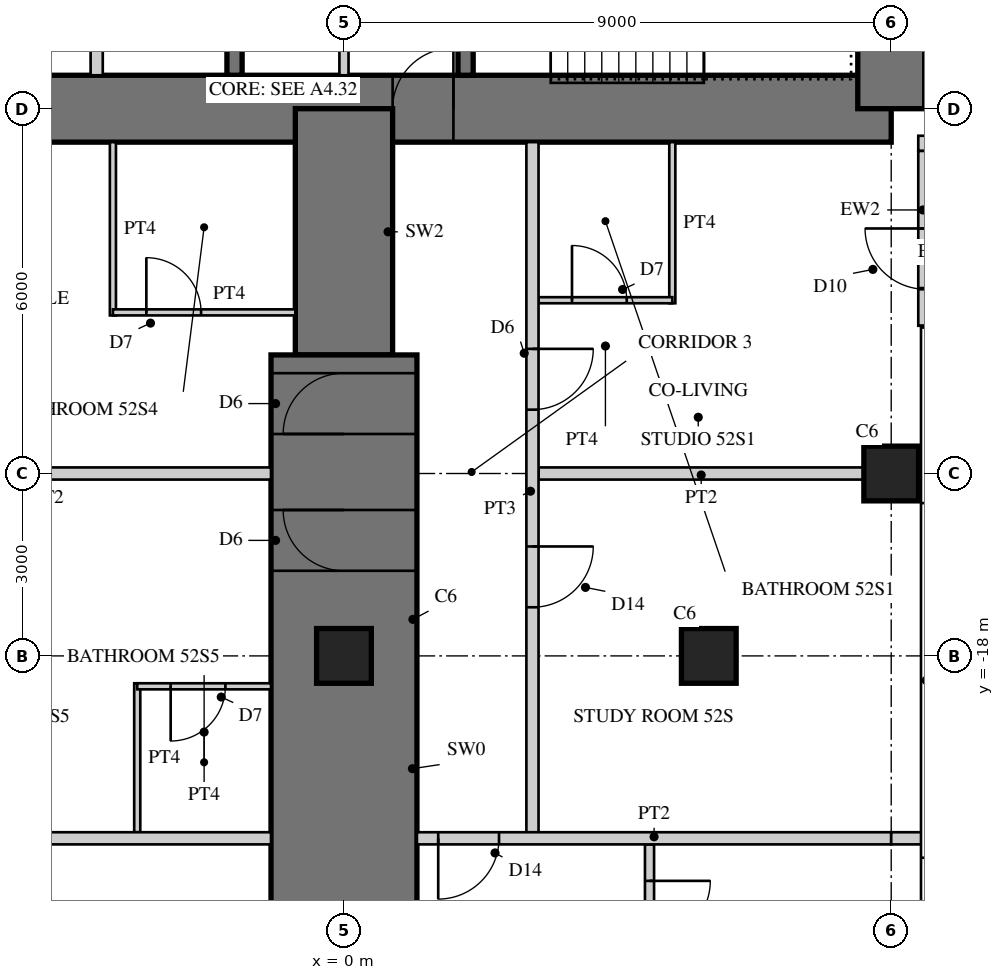
"""IFC4 building model, lengths in metres.
Left out: names, types, materials, properties, quantities, classifications, styles, units other than length and angle.
Written with IfcOpenShell. Run it as: python <this file> out.ifc"""

import sys

from ifc_helpers import new_model, si_unit, direction, frame, frame_2d, origin, origin_2d, place, context, subcontext, project, spatial, rectangle, hollow_rectangle, extrude, element, fill, save


model = new_model("IFC4")
c1 = context("Model", 3, precision=1e-05, world=origin(), true_north=direction((0.0, 1.0)))
c2 = subcontext(c1, "Body", "Model", "MODEL_VIEW")
j1 = project(units=[si_unit("LENGTHUNIT", "METRE"), si_unit("PLANEANGLEUNIT", "RADIAN")], contexts=[c1])
p1 = place(None, origin())
s1 = spatial("IfcSite", under=j1, at=p1, CompositionType="ELEMENT")
p2 = place(p1, origin())
s2 = spatial("IfcBuilding", under=s1, at=p2, CompositionType="ELEMENT")
p3 = place(p2, frame((0.0, 0.0, 206.9)))
s3 = spatial("IfcBuildingStorey", under=s2, at=p3, CompositionType="ELEMENT", Elevation=206.9)
p4 = place(p3, frame((-9.0, -9.0, 0.0), z_axis=(0.0, 0.0, 1.0), x_axis=(1.0, 0.0, 0.0)))
e1 = element("IfcWall", 1, at=p4, inside=s3, PredefinedType="SHEAR", context=c2, shape_type="SweptSolid", body=[
    extrude(rectangle(XDim=18.0, YDim=1.1, at=frame_2d((9.0, 0.0))), origin(), (0.0, 0.0, 1.0), 3.4),
])
p5 = place(p4, frame((9.8, 0.0, 0.0)))
e2 = element("IfcOpeningElement", 2, at=p5, cuts=e1, PredefinedType="OPENING", context=c2, shape_type="SweptSolid", body=[
    extrude(rectangle(XDim=1.0, YDim=2.4, at=frame_2d((0.5, 1.2))), frame((0.0, 0.56, 0.0), z_axis=(0.0, -1.0, 0.0), x_axis=(1.0, 0.0, 0.0)), (0.0, 0.0, 1.0), 1.12),
])
p6 = place(p3, frame((9.0, -9.0, 0.0), z_axis=(0.0, 0.0, 1.0), x_axis=(0.0, 1.0, 0.0)))
e3 = element("IfcWall", 3, at=p6, inside=s3, PredefinedType="SHEAR", context=c2, shape_type="SweptSolid", body=[
    extrude(rectangle(XDim=18.0, YDim=1.1, at=frame_2d((9.0, 0.0))), origin(), (0.0, 0.0, 1.0), 3.4),
])
p7 = place(p6, frame((9.8, 0.0, 0.0)))
e4 = element("IfcOpeningElement", 4, at=p7, cuts=e3, PredefinedType="OPENING", context=c2, shape_type="SweptSolid", body=[
    extrude(rectangle(XDim=1.0, YDim=2.4, at=frame_2d((0.5, 1.2))), frame((0.0, 0.56, 0.0), z_axis=(0.0, -1.0, 0.0), x_axis=(1.0, 0.0, 0.0)), (0.0, 0.0, 1.0), 1.12),
])
p8 = place(p3, frame((-1.8, -1.875, 0.0), z_axis=(0.0, 0.0, 1.0), x_axis=(0.0, -1.0, 0.0)))
e5 = element("IfcWall", 5, at=p8, inside=s3, PredefinedType="SHEAR", context=c2, shape_type="SweptSolid", body=[
    extrude(rectangle(XDim=6.575, YDim=0.25, at=frame_2d((3.288, 0.0))), origin(), (0.0, 0.0, 1.0), 3.4),
])
p9 = place(p8, frame((1.875, 0.0, 0.0)))
e6 = element("IfcOpeningElement", 6, at=p9, cuts=e5, PredefinedType="OPENING", context=c2, shape_type="SweptSolid", body=[
    extrude(rectangle(XDim=1.6, YDim=2.4, at=frame_2d((0.8, 1.2))), frame((0.0, 0.135, 0.0), z_axis=(0.0, -1.0, 0.0), x_axis=(1.0, 0.0, 0.0)), (0.0, 0.0, 1.0), 0.27),
])
p10 = place(p3, frame((-4.067, -5.975, 0.0), z_axis=(0.0, 0.0, 1.0), x_axis=(0.0, -1.0, 0.0)))
e7 = element("IfcWall", 7, at=p10, inside=s3, PredefinedType="PARTITIONING", context=c2, shape_type="SweptSolid", body=[
    extrude(rectangle(XDim=2.475, YDim=0.2, at=frame_2d((1.237, 0.0))), origin(), (0.0, 0.0, 1.0), 3.4),
])
p11 = place(p3, frame((2.0, -1.675, 0.0), z_axis=(0.0, 0.0, 1.0), x_axis=(0.0, -1.0, 0.0)))
e8 = element("IfcWall", 8, at=p11, inside=s3, PredefinedType="SHEAR", context=c2, shape_type="SweptSolid", body=[
    extrude(rectangle(XDim=6.775, YDim=0.25, at=frame_2d((3.387, 0.0))), origin(), (0.0, 0.0, 1.0), 3.4),
])
p12 = place(p11, frame((0.725, 0.0, 0.0)))
e9 = element("IfcOpeningElement", 9, at=p12, cuts=e8, PredefinedType="OPENING", context=c2, shape_type="SweptSolid", body=[
    extrude(rectangle(XDim=1.0, YDim=2.1, at=frame_2d((0.5, 1.05))), frame((0.0, 0.135, 0.0), z_axis=(0.0, -1.0, 0.0), x_axis=(1.0, 0.0, 0.0)), (0.0, 0.0, 1.0), 0.27),
])
p13 = place(p3, frame((0.0, -9.0, 0.0), z_axis=(0.0, 0.0, 1.0), x_axis=(0.0, -1.0, 0.0)))
e10 = element("IfcWall", 10, at=p13, inside=s3, PredefinedType="SHEAR", context=c2, shape_type="SweptSolid", body=[
    extrude(rectangle(XDim=4.05, YDim=1.6, at=frame_2d((2.025, 0.0))), origin(), (0.0, 0.0, 1.0), 3.4),
])
p14 = place(p3, frame((0.0, -13.05, 0.0), z_axis=(0.0, 0.0, 1.0), x_axis=(0.0, -1.0, 0.0)))
e11 = element("IfcWall", 11, at=p14, inside=s3, PredefinedType="SHEAR", context=c2, shape_type="SweptSolid", body=[
    extrude(rectangle(XDim=13.95, YDim=2.4, at=frame_2d((6.975, 0.0))), origin(), (0.0, 0.0, 1.0), 3.4),
])
p15 = place(p14, frame((0.3, 0.0, 0.0)))
e12 = element("IfcOpeningElement", 12, at=p15, cuts=e11, PredefinedType="OPENING", context=c2, shape_type="SweptSolid", body=[
    extrude(rectangle(XDim=1.0, YDim=2.15, at=frame_2d((0.5, 1.075))), frame((0.0, 1.21, 0.0), z_axis=(0.0, -1.0, 0.0), x_axis=(1.0, 0.0, 0.0)), (0.0, 0.0, 1.0), 2.42),
])
p16 = place(p14, frame((2.55, 0.0, 0.0)))
e13 = element("IfcOpeningElement", 13, at=p16, cuts=e11, PredefinedType="OPENING", context=c2, shape_type="SweptSolid", body=[
    extrude(rectangle(XDim=1.0, YDim=2.15, at=frame_2d((0.5, 1.075))), frame((0.0, 1.21, 0.0), z_axis=(0.0, -1.0, 0.0), x_axis=(1.0, 0.0, 0.0)), (0.0, 0.0, 1.0), 2.42),
])
p17 = place(p14, frame((9.2, 0.0, 0.0)))
e14 = element("IfcOpeningElement", 14, at=p17, cuts=e11, PredefinedType="OPENING", context=c2, shape_type="SweptSolid", body=[
    extrude(rectangle(XDim=1.0, YDim=2.2, at=frame_2d((0.5, 1.1))), frame((0.0, 1.21, 0.0), z_axis=(0.0, -1.0, 0.0), x_axis=(1.0, 0.0, 0.0)), (0.0, 0.0, 1.0), 2.42),
])
for number, where, z_axis, x_axis in (
    (15, (9.0, -15.0, 0.0), (0.0, 0.0, 1.0), (1.0, 0.0, 0.0)),
    (16, (0.0, -18.0, 0.0), (0.0, 0.0, 1.0), (1.0, 0.0, 0.0)),
    (17, (6.0, -18.0, 0.0), (0.0, 0.0, 1.0), (1.0, 0.0, 0.0)),
):
    element("IfcColumn", number, at=place(p3, frame(where, z_axis=z_axis, x_axis=x_axis)), inside=s3, PredefinedType="COLUMN", context=c2, shape_type="SweptSolid", body=[
        extrude(rectangle(XDim=0.9, YDim=0.9, at=origin_2d()), origin(), (0.0, 0.0, 1.0), 3.4),
    ])
p18 = place(p3, frame((9.445, -9.57, 0.0), z_axis=(0.0, 0.0, 1.0), x_axis=(1.0, 0.0, 0.0)))
e18 = element("IfcWall", 18, at=p18, inside=s3, PredefinedType="SOLIDWALL", context=c2, shape_type="SweptSolid", body=[
    extrude(rectangle(XDim=3.125, YDim=0.25, at=frame_2d((1.562, 0.0))), origin(), (0.0, 0.0, 1.0), 3.22),
])
p19 = place(p18, frame((0.6, 0.0, 0.0)))
e19 = element("IfcOpeningElement", 19, at=p19, cuts=e18, PredefinedType="OPENING", context=c2, shape_type="SweptSolid", body=[
    extrude(rectangle(XDim=1.0, YDim=2.2, at=frame_2d((0.5, 1.1))), frame((0.0, 0.135, 0.0), z_axis=(0.0, -1.0, 0.0), x_axis=(1.0, 0.0, 0.0)), (0.0, 0.0, 1.0), 0.27),
])
p20 = place(p3, frame((9.57, -12.57, 0.0), z_axis=(0.0, 0.0, 1.0), x_axis=(0.0, 1.0, 0.0)))
e20 = element("IfcWall", 20, at=p20, inside=s3, PredefinedType="SOLIDWALL", context=c2, shape_type="SweptSolid", body=[
    extrude(rectangle(XDim=2.875, YDim=0.25, at=frame_2d((1.438, 0.0))), origin(), (0.0, 0.0, 1.0), 3.22),
])
p21 = place(p20, frame((0.6, 0.0, 0.0)))
e21 = element("IfcOpeningElement", 21, at=p21, cuts=e20, PredefinedType="OPENING", context=c2, shape_type="SweptSolid", body=[
    extrude(rectangle(XDim=1.0, YDim=2.2, at=frame_2d((0.5, 1.1))), frame((0.0, 0.135, 0.0), z_axis=(0.0, -1.0, 0.0), x_axis=(1.0, 0.0, 0.0)), (0.0, 0.0, 1.0), 0.27),
])
p22 = place(p3, frame((0.0, -5.675, 0.0), z_axis=(0.0, 0.0, 1.0), x_axis=(0.0, -1.0, 0.0)))
e22 = element("IfcWall", 22, at=p22, inside=s3, PredefinedType="PARTITIONING", context=c2, shape_type="SweptSolid", body=[
    extrude(rectangle(XDim=2.775, YDim=0.15, at=frame_2d((1.387, 0.0))), origin(), (0.0, 0.0, 1.0), 3.22),
])
p23 = place(p22, frame((0.4, 0.0, 0.0)))
e23 = element("IfcOpeningElement", 23, at=p23, cuts=e22, PredefinedType="OPENING", context=c2, shape_type="SweptSolid", body=[
    extrude(rectangle(XDim=1.0, YDim=2.1, at=frame_2d((0.5, 1.05))), frame((0.0, 0.085, 0.0), z_axis=(0.0, -1.0, 0.0), x_axis=(1.0, 0.0, 0.0)), (0.0, 0.0, 1.0), 0.17),
])
p24 = place(p3, frame((5.4, -9.55, 0.0), z_axis=(0.0, 0.0, 1.0), x_axis=(0.0, -1.0, 0.0)))
e24 = element("IfcWall", 24, at=p24, inside=s3, PredefinedType="PARTITIONING", context=c2, shape_type="SweptSolid", body=[
    extrude(rectangle(XDim=2.65, YDim=0.1, at=frame_2d((1.325, 0.0))), origin(), (0.0, 0.0, 1.0), 3.22),
])
p25 = place(p3, frame((3.2, -12.15, 0.0), z_axis=(0.0, 0.0, 1.0), x_axis=(1.0, 0.0, 0.0)))
e25 = element("IfcWall", 25, at=p25, inside=s3, PredefinedType="PARTITIONING", context=c2, shape_type="SweptSolid", body=[
    extrude(rectangle(XDim=2.2, YDim=0.1, at=frame_2d((1.1, 0.0))), origin(), (0.0, 0.0, 1.0), 3.22),
])
p26 = place(p25, frame((0.55, 0.0, 0.0)))
e26 = element("IfcOpeningElement", 26, at=p26, cuts=e25, PredefinedType="OPENING", context=c2, shape_type="SweptSolid", body=[
    extrude(rectangle(XDim=0.9, YDim=2.1, at=frame_2d((0.45, 1.05))), frame((0.0, 0.06, 0.0), z_axis=(0.0, -1.0, 0.0), x_axis=(1.0, 0.0, 0.0)), (0.0, 0.0, 1.0), 0.12),
])
p27 = place(p3, frame((-3.8, -9.55, 0.0), z_axis=(0.0, 0.0, 1.0), x_axis=(0.0, -1.0, 0.0)))
e27 = element("IfcWall", 27, at=p27, inside=s3, PredefinedType="PARTITIONING", context=c2, shape_type="SweptSolid", body=[
    extrude(rectangle(XDim=2.85, YDim=0.1, at=frame_2d((1.425, 0.0))), origin(), (0.0, 0.0, 1.0), 3.22),
])
p28 = place(p3, frame((-3.8, -12.35, 0.0), z_axis=(0.0, 0.0, 1.0), x_axis=(1.0, 0.0, 0.0)))
e28 = element("IfcWall", 28, at=p28, inside=s3, PredefinedType="PARTITIONING", context=c2, shape_type="SweptSolid", body=[
    extrude(rectangle(XDim=3.0, YDim=0.1, at=frame_2d((1.5, 0.0))), origin(), (0.0, 0.0, 1.0), 3.22),
])
p29 = place(p28, frame((0.55, 0.0, 0.0)))
e29 = element("IfcOpeningElement", 29, at=p29, cuts=e28, PredefinedType="OPENING", context=c2, shape_type="SweptSolid", body=[
    extrude(rectangle(XDim=0.9, YDim=2.1, at=frame_2d((0.45, 1.05))), frame((0.0, 0.06, 0.0), z_axis=(0.0, -1.0, 0.0), x_axis=(1.0, 0.0, 0.0)), (0.0, 0.0, 1.0), 0.12),
])
p30 = place(p3, frame((3.2, -15.0, 0.0), z_axis=(0.0, 0.0, 1.0), x_axis=(1.0, 0.0, 0.0)))
e30 = element("IfcWall", 30, at=p30, inside=s3, PredefinedType="SOLIDWALL", context=c2, shape_type="SweptSolid", body=[
    extrude(rectangle(XDim=5.35, YDim=0.2, at=frame_2d((2.675, 0.0))), origin(), (0.0, 0.0, 1.0), 2.47),
])
p31 = place(p3, frame((-8.55, -15.0, 0.0), z_axis=(0.0, 0.0, 1.0), x_axis=(1.0, 0.0, 0.0)))
e31 = element("IfcWall", 31, at=p31, inside=s3, PredefinedType="SOLIDWALL", context=c2, shape_type="SweptSolid", body=[
    extrude(rectangle(XDim=7.35, YDim=0.2, at=frame_2d((3.675, 0.0))), origin(), (0.0, 0.0, 1.0), 2.47),
])
p32 = place(p3, frame((-3.4, -18.45, 0.0), z_axis=(0.0, 0.0, 1.0), x_axis=(0.0, -1.0, 0.0)))
e32 = element("IfcWall", 32, at=p32, inside=s3, PredefinedType="PARTITIONING", context=c2, shape_type="SweptSolid", body=[
    extrude(rectangle(XDim=2.45, YDim=0.1, at=frame_2d((1.225, 0.0))), origin(), (0.0, 0.0, 1.0), 3.22),
])
p33 = place(p3, frame((-3.4, -18.5, 0.0), z_axis=(0.0, 0.0, 1.0), x_axis=(1.0, 0.0, 0.0)))
e33 = element("IfcWall", 33, at=p33, inside=s3, PredefinedType="PARTITIONING", context=c2, shape_type="SweptSolid", body=[
    extrude(rectangle(XDim=2.2, YDim=0.1, at=frame_2d((1.1, 0.0))), origin(), (0.0, 0.0, 1.0), 3.22),
])
p34 = place(p33, frame((0.55, 0.0, 0.0)))
e34 = element("IfcOpeningElement", 34, at=p34, cuts=e33, PredefinedType="OPENING", context=c2, shape_type="SweptSolid", body=[
    extrude(rectangle(XDim=0.9, YDim=2.1, at=frame_2d((0.45, 1.05))), frame((0.0, 0.06, 0.0), z_axis=(0.0, -1.0, 0.0), x_axis=(1.0, 0.0, 0.0)), (0.0, 0.0, 1.0), 0.12),
])
p35 = place(p3, frame((3.1, -9.55, 0.0), z_axis=(0.0, 0.0, 1.0), x_axis=(0.0, -1.0, 0.0)))
e35 = element("IfcWall", 35, at=p35, inside=s3, PredefinedType="SOLIDWALL", context=c2, shape_type="SweptSolid", body=[
    extrude(rectangle(XDim=11.45, YDim=0.2, at=frame_2d((5.725, 0.0))), origin(), (0.0, 0.0, 1.0), 3.22),
])
p36 = place(p35, frame((3.4, 0.0, 0.0)))
e36 = element("IfcOpeningElement", 36, at=p36, cuts=e35, PredefinedType="OPENING", context=c2, shape_type="SweptSolid", body=[
    extrude(rectangle(XDim=1.0, YDim=2.15, at=frame_2d((0.5, 1.075))), frame((0.0, 0.11, 0.0), z_axis=(0.0, -1.0, 0.0), x_axis=(1.0, 0.0, 0.0)), (0.0, 0.0, 1.0), 0.22),
])
p37 = place(p35, frame((6.65, 0.0, 0.0)))
e37 = element("IfcOpeningElement", 37, at=p37, cuts=e35, PredefinedType="OPENING", context=c2, shape_type="SweptSolid", body=[
    extrude(rectangle(XDim=1.0, YDim=2.2, at=frame_2d((0.5, 1.1))), frame((0.0, 0.11, 0.0), z_axis=(0.0, -1.0, 0.0), x_axis=(1.0, 0.0, 0.0)), (0.0, 0.0, 1.0), 0.22),
])
p38 = place(p3, frame((5.025, -21.1, 0.0), z_axis=(0.0, 0.0, 1.0), x_axis=(0.0, -1.0, 0.0)))
e38 = element("IfcWall", 38, at=p38, inside=s3, PredefinedType="PARTITIONING", context=c2, shape_type="SweptSolid", body=[
    extrude(rectangle(XDim=5.45, YDim=0.15, at=frame_2d((2.725, 0.0))), origin(), (0.0, 0.0, 1.0), 3.22),
])
p39 = place(p38, frame((0.6, 0.0, 0.0)))
e39 = element("IfcOpeningElement", 39, at=p39, cuts=e38, PredefinedType="OPENING", context=c2, shape_type="SweptSolid", body=[
    extrude(rectangle(XDim=1.0, YDim=2.1, at=frame_2d((0.5, 1.05))), frame((0.0, 0.085, 0.0), z_axis=(0.0, -1.0, 0.0), x_axis=(1.0, 0.0, 0.0)), (0.0, 0.0, 1.0), 0.17),
])
p40 = place(p3, frame((-9.0, -21.0, 0.0), z_axis=(0.0, 0.0, 1.0), x_axis=(1.0, 0.0, 0.0)))
e40 = element("IfcWall", 40, at=p40, inside=s3, PredefinedType="SOLIDWALL", context=c2, shape_type="SweptSolid", body=[
    extrude(rectangle(XDim=7.8, YDim=0.2, at=frame_2d((3.9, 0.0))), origin(), (0.0, 0.0, 1.0), 2.62),
])
p41 = place(p3, frame((1.2, -21.0, 0.0), z_axis=(0.0, 0.0, 1.0), x_axis=(1.0, 0.0, 0.0)))
e41 = element("IfcWall", 41, at=p41, inside=s3, PredefinedType="SOLIDWALL", context=c2, shape_type="SweptSolid", body=[
    extrude(rectangle(XDim=7.8, YDim=0.2, at=frame_2d((3.9, 0.0))), origin(), (0.0, 0.0, 1.0), 2.62),
])
p42 = place(p41, frame((0.35, 0.0, 0.0)))
e42 = element("IfcOpeningElement", 42, at=p42, cuts=e41, PredefinedType="OPENING", context=c2, shape_type="SweptSolid", body=[
    extrude(rectangle(XDim=1.0, YDim=2.2, at=frame_2d((0.5, 1.1))), frame((0.0, 0.11, 0.0), z_axis=(0.0, -1.0, 0.0), x_axis=(1.0, 0.0, 0.0)), (0.0, 0.0, 1.0), 0.22),
])
p43 = place(p3, frame((9.0, -21.0, 0.0), z_axis=(0.0, 0.0, 1.0), x_axis=(1.0, 0.0, 0.0)))
e43 = element("IfcWall", 43, at=p43, inside=s3, PredefinedType="SOLIDWALL", context=c2, shape_type="SweptSolid", body=[
    extrude(rectangle(XDim=0.53, YDim=0.2, at=frame_2d((0.265, 0.0))), origin(), (0.0, 0.0, 1.0), 3.22),
])
p44 = place(p21, origin())
e44 = element("IfcDoor", 44, at=p44, inside=s3, OperationType="SINGLE_SWING_RIGHT", PredefinedType="DOOR", context=c2, shape_type="SweptSolid", body=[
    extrude(hollow_rectangle(XDim=1.0, YDim=2.2, WallThickness=0.06, at=frame_2d((0.5, 1.1))), frame((0.0, 0.025, 0.0), z_axis=(0.0, -1.0, 0.0), x_axis=(1.0, 0.0, 0.0)), (0.0, 0.0, 1.0), 0.05),
    extrude(rectangle(XDim=0.879, YDim=2.079, at=frame_2d((0.5, 1.1))), frame((0.0, 0.025, 0.0), z_axis=(0.0, -1.0, 0.0), x_axis=(1.0, 0.0, 0.0)), (0.0, 0.0, 1.0), 0.05),
])
fill(e21, e44)
p45 = place(p26, origin())
e45 = element("IfcDoor", 45, at=p45, inside=s3, OperationType="SINGLE_SWING_LEFT", PredefinedType="DOOR", context=c2, shape_type="SweptSolid", body=[
    extrude(rectangle(XDim=0.9, YDim=2.1, at=frame_2d((0.45, 1.05))), frame((0.0, 0.025, 0.0), z_axis=(0.0, -1.0, 0.0), x_axis=(1.0, 0.0, 0.0)), (0.0, 0.0, 1.0), 0.05),
])
fill(e26, e45)
p46 = place(p29, origin())
e46 = element("IfcDoor", 46, at=p46, inside=s3, OperationType="SINGLE_SWING_LEFT", PredefinedType="DOOR", context=c2, shape_type="SweptSolid", body=[
    extrude(rectangle(XDim=0.9, YDim=2.1, at=frame_2d((0.45, 1.05))), frame((0.0, 0.025, 0.0), z_axis=(0.0, -1.0, 0.0), x_axis=(1.0, 0.0, 0.0)), (0.0, 0.0, 1.0), 0.05),
])
fill(e29, e46)
p47 = place(p34, frame((0.9, 0.0, 0.0), z_axis=(0.0, 0.0, 1.0), x_axis=(-1.0, 0.0, 0.0)))
e47 = element("IfcDoor", 47, at=p47, inside=s3, OperationType="SINGLE_SWING_RIGHT", PredefinedType="DOOR", context=c2, shape_type="SweptSolid", body=[
    extrude(rectangle(XDim=0.9, YDim=2.1, at=frame_2d((0.45, 1.05))), frame((0.0, 0.025, 0.0), z_axis=(0.0, -1.0, 0.0), x_axis=(1.0, 0.0, 0.0)), (0.0, 0.0, 1.0), 0.05),
])
fill(e34, e47)
p48 = place(p36, origin())
e48 = element("IfcDoor", 48, at=p48, inside=s3, OperationType="SINGLE_SWING_LEFT", PredefinedType="DOOR", context=c2, shape_type="SweptSolid", body=[
    extrude(rectangle(XDim=1.0, YDim=2.15, at=frame_2d((0.5, 1.075))), frame((0.0, 0.025, 0.0), z_axis=(0.0, -1.0, 0.0), x_axis=(1.0, 0.0, 0.0)), (0.0, 0.0, 1.0), 0.05),
])
fill(e36, e48)
p49 = place(p37, origin())
e49 = element("IfcDoor", 49, at=p49, inside=s3, OperationType="SINGLE_SWING_LEFT", PredefinedType="DOOR", context=c2, shape_type="SweptSolid", body=[
    extrude(rectangle(XDim=1.0, YDim=2.2, at=frame_2d((0.5, 1.1))), frame((0.0, 0.025, 0.0), z_axis=(0.0, -1.0, 0.0), x_axis=(1.0, 0.0, 0.0)), (0.0, 0.0, 1.0), 0.05),
])
fill(e37, e49)
p50 = place(p39, origin())
e50 = element("IfcDoor", 50, at=p50, inside=s3, OperationType="SINGLE_SWING_LEFT", PredefinedType="DOOR", context=c2, shape_type="SweptSolid", body=[
    extrude(rectangle(XDim=1.0, YDim=2.1, at=frame_2d((0.5, 1.05))), frame((0.0, 0.025, 0.0), z_axis=(0.0, -1.0, 0.0), x_axis=(1.0, 0.0, 0.0)), (0.0, 0.0, 1.0), 0.05),
])
fill(e39, e50)
p51 = place(p42, frame((1.0, 0.0, 0.0), z_axis=(0.0, 0.0, 1.0), x_axis=(-1.0, 0.0, 0.0)))
e51 = element("IfcDoor", 51, at=p51, inside=s3, OperationType="SINGLE_SWING_RIGHT", PredefinedType="DOOR", context=c2, shape_type="SweptSolid", body=[
    extrude(rectangle(XDim=1.0, YDim=2.2, at=frame_2d((0.5, 1.1))), frame((0.0, 0.025, 0.0), z_axis=(0.0, -1.0, 0.0), x_axis=(1.0, 0.0, 0.0)), (0.0, 0.0, 1.0), 0.05),
])
fill(e42, e51)
p52 = place(p15, frame((1.0, 0.0, 0.0), z_axis=(0.0, 0.0, 1.0), x_axis=(-1.0, 0.0, 0.0)))
e52 = element("IfcDoor", 52, at=p52, inside=s3, OperationType="SINGLE_SWING_LEFT", PredefinedType="DOOR", context=c2, shape_type="SweptSolid", body=[
    extrude(rectangle(XDim=1.0, YDim=2.15, at=frame_2d((0.5, 1.075))), frame((0.0, 0.025, 0.0), z_axis=(0.0, -1.0, 0.0), x_axis=(1.0, 0.0, 0.0)), (0.0, 0.0, 1.0), 0.05),
])
fill(e12, e52)
p53 = place(p16, frame((1.0, 0.0, 0.0), z_axis=(0.0, 0.0, 1.0), x_axis=(-1.0, 0.0, 0.0)))
e53 = element("IfcDoor", 53, at=p53, inside=s3, OperationType="SINGLE_SWING_RIGHT", PredefinedType="DOOR", context=c2, shape_type="SweptSolid", body=[
    extrude(rectangle(XDim=1.0, YDim=2.15, at=frame_2d((0.5, 1.075))), frame((0.0, 0.025, 0.0), z_axis=(0.0, -1.0, 0.0), x_axis=(1.0, 0.0, 0.0)), (0.0, 0.0, 1.0), 0.05),
])
fill(e13, e53)
p54 = place(p5, origin())
e54 = element("IfcDoor", 54, at=p54, inside=s3, OperationType="SINGLE_SWING_RIGHT", PredefinedType="DOOR", context=c2, shape_type="SweptSolid", body=[
    extrude(rectangle(XDim=1.0, YDim=2.4, at=frame_2d((0.5, 1.2))), frame((0.0, 0.055, 0.0), z_axis=(0.0, -1.0, 0.0), x_axis=(1.0, 0.0, 0.0)), (0.0, 0.0, 1.0), 0.05),
])
fill(e2, e54)
save(model, sys.argv[1])
